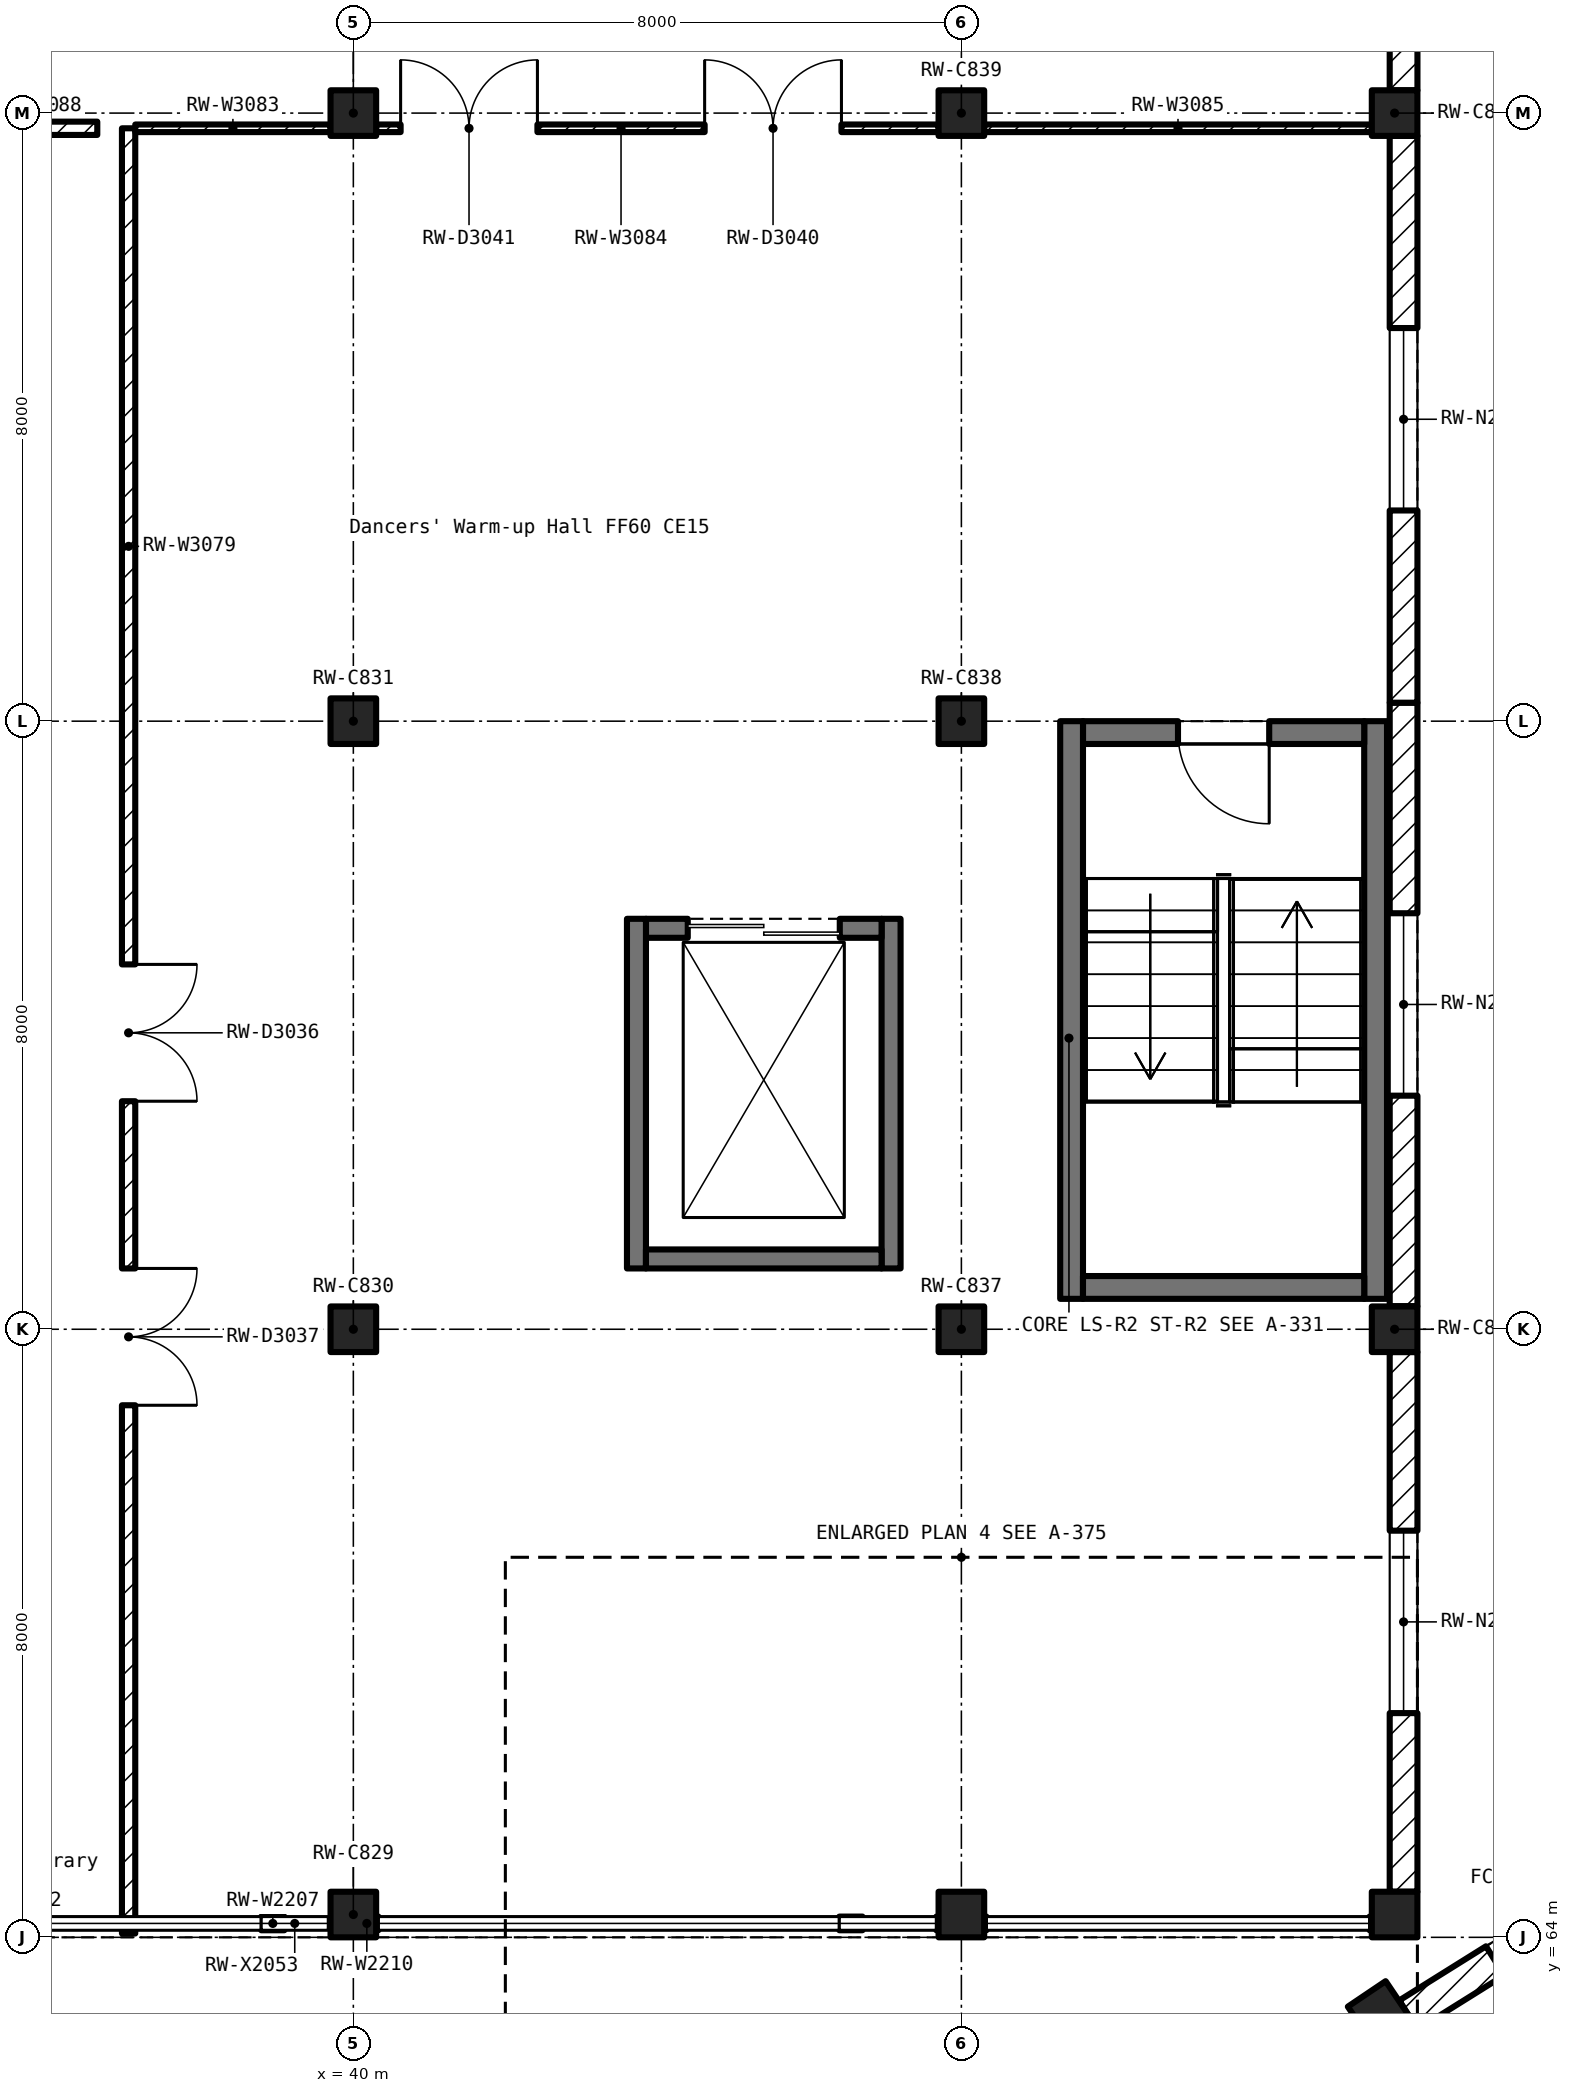
"""IFC4 building model, lengths in metres.
Left out: names, types, materials, properties, quantities, classifications, styles, units other than length and angle.
Written with IfcOpenShell. Run it as: python <this file> out.ifc"""

import sys

from ifc_helpers import new_model, si_unit, direction, frame, frame_2d, origin, origin_2d, place, context, subcontext, project, spatial, rectangle, extrude, element, fill, save


model = new_model("IFC4")
c1 = context("Model", 3, precision=1e-05, world=origin(), true_north=direction((0.0, 1.0)))
c2 = subcontext(c1, "Body", "Model", "MODEL_VIEW")
j1 = project(units=[si_unit("LENGTHUNIT", "METRE"), si_unit("PLANEANGLEUNIT", "RADIAN")], contexts=[c1])
p1 = place(None, origin())
s1 = spatial("IfcSite", under=j1, at=p1, CompositionType="ELEMENT")
p2 = place(p1, origin())
s2 = spatial("IfcBuilding", under=s1, at=p2, CompositionType="ELEMENT")
p3 = place(p2, frame((0.0, 0.0, 17.0)))
s3 = spatial("IfcBuildingStorey", under=s2, at=p3, CompositionType="ELEMENT", Elevation=17.0)
for number, where, z_axis, x_axis in (
    (1, (53.501, 63.007, 0.0), (0.0, 0.0, 1.0), (0.829, 0.559, 0.0)),
    (2, (40.0, 64.3, 0.0), (0.0, 0.0, 1.0), (1.0, 0.0, 0.0)),
    (3, (40.0, 72.0, 0.0), (0.0, 0.0, 1.0), (1.0, 0.0, 0.0)),
    (4, (40.0, 80.0, 0.0), (0.0, 0.0, 1.0), (1.0, 0.0, 0.0)),
    (5, (40.0, 88.0, 0.0), (0.0, 0.0, 1.0), (1.0, 0.0, 0.0)),
    (6, (48.0, 64.3, 0.0), (0.0, 0.0, 1.0), (1.0, 0.0, 0.0)),
    (7, (48.0, 72.0, 0.0), (0.0, 0.0, 1.0), (1.0, 0.0, 0.0)),
    (8, (48.0, 80.0, 0.0), (0.0, 0.0, 1.0), (1.0, 0.0, 0.0)),
    (9, (48.0, 88.0, 0.0), (0.0, 0.0, 1.0), (1.0, 0.0, 0.0)),
    (10, (53.7, 64.3, 0.0), (0.0, 0.0, 1.0), (1.0, 0.0, 0.0)),
    (11, (53.7, 72.0, 0.0), (0.0, 0.0, 1.0), (1.0, 0.0, 0.0)),
    (12, (53.7, 88.0, 0.0), (0.0, 0.0, 1.0), (1.0, 0.0, 0.0)),
):
    element("IfcColumn", number, at=place(p3, frame(where, z_axis=z_axis, x_axis=x_axis)), inside=s3, PredefinedType="COLUMN", context=c2, shape_type="SweptSolid", body=[
        extrude(rectangle(XDim=0.6, YDim=0.6, at=origin_2d()), origin(), (0.0, 0.0, 1.0), 5.5),
    ])
p4 = place(p3, frame((53.881, 62.979, 0.0), z_axis=(0.0, 0.0, 1.0), x_axis=(0.848094792162, 0.529844527676, 0.0)))
e13 = element("IfcWall", 13, at=p4, inside=s3, PredefinedType="SOLIDWALL", context=c2, shape_type="SweptSolid", body=[
    extrude(rectangle(XDim=4.69, YDim=0.45, at=frame_2d((2.345, 0.0))), origin(), (0.0, 0.0, 1.0), 4.48),
])
p5 = place(p4, frame((1.345, 0.0, 1.0)))
e14 = element("IfcOpeningElement", 14, at=p5, cuts=e13, PredefinedType="OPENING", context=c2, shape_type="SweptSolid", body=[
    extrude(rectangle(XDim=2.0, YDim=2.8, at=frame_2d((1.0, 1.4))), frame((0.0, 0.237, 0.0), z_axis=(0.0, -1.0, 0.0), x_axis=(1.0, 0.0, 0.0)), (0.0, 0.0, 1.0), 0.474),
])
p6 = place(p3, frame((53.818, 64.6, 0.0), z_axis=(0.0, 0.0, 1.0), x_axis=(0.0, 1.0, 0.0)))
e15 = element("IfcWall", 15, at=p6, inside=s3, PredefinedType="SOLIDWALL", context=c2, shape_type="SweptSolid", body=[
    extrude(rectangle(XDim=7.1, YDim=0.365, at=frame_2d((3.55, 0.0))), origin(), (0.0, 0.0, 1.0), 4.45),
])
p7 = place(p6, frame((2.35, 0.0, 1.0)))
e16 = element("IfcOpeningElement", 16, at=p7, cuts=e15, PredefinedType="OPENING", context=c2, shape_type="SweptSolid", body=[
    extrude(rectangle(XDim=2.4, YDim=2.0, at=frame_2d((1.2, 1.0))), frame((0.0, 0.195, 0.0), z_axis=(0.0, -1.0, 0.0), x_axis=(1.0, 0.0, 0.0)), (0.0, 0.0, 1.0), 0.389),
])
p8 = place(p3, frame((53.818, 72.304, 0.0), z_axis=(0.0, 0.0, 1.0), x_axis=(0.0, 1.0, 0.0)))
e17 = element("IfcWall", 17, at=p8, inside=s3, PredefinedType="SOLIDWALL", context=c2, shape_type="SweptSolid", body=[
    extrude(rectangle(XDim=7.939, YDim=0.365, at=frame_2d((3.969, 0.0))), origin(), (0.0, 0.0, 1.0), 4.55),
])
p9 = place(p8, frame((2.769, 0.0, 1.0)))
e18 = element("IfcOpeningElement", 18, at=p9, cuts=e17, PredefinedType="OPENING", context=c2, shape_type="SweptSolid", body=[
    extrude(rectangle(XDim=2.4, YDim=2.0, at=frame_2d((1.2, 1.0))), frame((0.0, 0.195, 0.0), z_axis=(0.0, -1.0, 0.0), x_axis=(1.0, 0.0, 0.0)), (0.0, 0.0, 1.0), 0.389),
])
p10 = place(p3, frame((53.818, 80.243, 0.0), z_axis=(0.0, 0.0, 1.0), x_axis=(0.0, 1.0, 0.0)))
e19 = element("IfcWall", 19, at=p10, inside=s3, PredefinedType="SOLIDWALL", context=c2, shape_type="SweptSolid", body=[
    extrude(rectangle(XDim=7.457, YDim=0.365, at=frame_2d((3.729, 0.0))), origin(), (0.0, 0.0, 1.0), 4.55),
])
p11 = place(p10, frame((2.529, 0.0, 1.0)))
e20 = element("IfcOpeningElement", 20, at=p11, cuts=e19, PredefinedType="OPENING", context=c2, shape_type="SweptSolid", body=[
    extrude(rectangle(XDim=2.4, YDim=2.0, at=frame_2d((1.2, 1.0))), frame((0.0, 0.195, 0.0), z_axis=(0.0, -1.0, 0.0), x_axis=(1.0, 0.0, 0.0)), (0.0, 0.0, 1.0), 0.389),
])
p12 = place(p3, frame((53.818, 88.3, 0.0), z_axis=(0.0, 0.0, 1.0), x_axis=(0.0, 1.0, 0.0)))
e21 = element("IfcWall", 21, at=p12, inside=s3, PredefinedType="SOLIDWALL", context=c2, shape_type="SweptSolid", body=[
    extrude(rectangle(XDim=7.4, YDim=0.365, at=frame_2d((3.7, 0.0))), origin(), (0.0, 0.0, 1.0), 4.55),
])
p13 = place(p12, frame((2.5, 0.0, 1.0)))
e22 = element("IfcOpeningElement", 22, at=p13, cuts=e21, PredefinedType="OPENING", context=c2, shape_type="SweptSolid", body=[
    extrude(rectangle(XDim=2.4, YDim=2.0, at=frame_2d((1.2, 1.0))), frame((0.0, 0.195, 0.0), z_axis=(0.0, -1.0, 0.0), x_axis=(1.0, 0.0, 0.0)), (0.0, 0.0, 1.0), 0.389),
])
p14 = place(p3, frame((53.45, 72.4, 0.0), z_axis=(0.0, 0.0, 1.0), x_axis=(0.0, 1.0, 0.0)))
e23 = element("IfcWall", 23, at=p14, inside=s3, PredefinedType="SOLIDWALL", context=c2, shape_type="SweptSolid", body=[
    extrude(rectangle(XDim=7.6, YDim=0.3, at=frame_2d((3.8, 0.0))), origin(), (0.0, 0.0, 1.0), 5.5),
])
p15 = place(p3, frame((53.3, 79.85, 0.0), z_axis=(0.0, 0.0, 1.0), x_axis=(-1.0, 0.0, 0.0)))
e24 = element("IfcWall", 24, at=p15, inside=s3, PredefinedType="SOLIDWALL", context=c2, shape_type="SweptSolid", body=[
    extrude(rectangle(XDim=3.7, YDim=0.3, at=frame_2d((1.85, 0.0))), origin(), (0.0, 0.0, 1.0), 5.5),
])
p16 = place(p15, frame((1.25, 0.0, 0.0)))
e25 = element("IfcOpeningElement", 25, at=p16, cuts=e24, PredefinedType="OPENING", context=c2, shape_type="SweptSolid", body=[
    extrude(rectangle(XDim=1.2, YDim=2.1, at=frame_2d((0.6, 1.05))), frame((0.0, 0.162, 0.0), z_axis=(0.0, -1.0, 0.0), x_axis=(1.0, 0.0, 0.0)), (0.0, 0.0, 1.0), 0.324),
])
p17 = place(p3, frame((49.45, 80.0, 0.0), z_axis=(0.0, 0.0, 1.0), x_axis=(0.0, -1.0, 0.0)))
e26 = element("IfcWall", 26, at=p17, inside=s3, PredefinedType="SOLIDWALL", context=c2, shape_type="SweptSolid", body=[
    extrude(rectangle(XDim=7.6, YDim=0.3, at=frame_2d((3.8, 0.0))), origin(), (0.0, 0.0, 1.0), 5.5),
])
p18 = place(p3, frame((49.6, 72.55, 0.0), z_axis=(0.0, 0.0, 1.0), x_axis=(1.0, 0.0, 0.0)))
e27 = element("IfcWall", 27, at=p18, inside=s3, PredefinedType="SOLIDWALL", context=c2, shape_type="SweptSolid", body=[
    extrude(rectangle(XDim=3.7, YDim=0.3, at=frame_2d((1.85, 0.0))), origin(), (0.0, 0.0, 1.0), 5.5),
])
p19 = place(p3, frame((59.019, 65.542, 0.0), z_axis=(0.0, 0.0, 1.0), x_axis=(-0.819160804606, -0.573563925118, 0.0)))
e28 = element("IfcWall", 28, at=p19, inside=s3, PredefinedType="SOLIDWALL", context=c2, shape_type="SweptSolid", body=[
    extrude(rectangle(XDim=5.0, YDim=0.3, at=frame_2d((2.5, 0.0))), origin(), (0.0, 0.0, 1.0), 5.5),
])
p20 = place(p3, frame((47.075, 72.8, 0.0), z_axis=(0.0, 0.0, 1.0), x_axis=(0.0, 1.0, 0.0)))
e29 = element("IfcWall", 29, at=p20, inside=s3, PredefinedType="SOLIDWALL", context=c2, shape_type="SweptSolid", body=[
    extrude(rectangle(XDim=4.6, YDim=0.25, at=frame_2d((2.3, 0.0))), origin(), (0.0, 0.0, 1.0), 5.35),
])
p21 = place(p3, frame((46.95, 77.275, 0.0), z_axis=(0.0, 0.0, 1.0), x_axis=(-1.0, 0.0, 0.0)))
e30 = element("IfcWall", 30, at=p21, inside=s3, PredefinedType="SOLIDWALL", context=c2, shape_type="SweptSolid", body=[
    extrude(rectangle(XDim=3.1, YDim=0.25, at=frame_2d((1.55, 0.0))), origin(), (0.0, 0.0, 1.0), 5.35),
])
p22 = place(p21, frame((0.55, 0.0, 0.0)))
e31 = element("IfcOpeningElement", 31, at=p22, cuts=e30, PredefinedType="OPENING", context=c2, shape_type="SweptSolid", body=[
    extrude(rectangle(XDim=2.0, YDim=2.2, at=frame_2d((1.0, 1.1))), frame((0.0, 0.137, 0.0), z_axis=(0.0, -1.0, 0.0), x_axis=(1.0, 0.0, 0.0)), (0.0, 0.0, 1.0), 0.274),
])
p23 = place(p3, frame((43.725, 77.4, 0.0), z_axis=(0.0, 0.0, 1.0), x_axis=(0.0, -1.0, 0.0)))
e32 = element("IfcWall", 32, at=p23, inside=s3, PredefinedType="SOLIDWALL", context=c2, shape_type="SweptSolid", body=[
    extrude(rectangle(XDim=4.6, YDim=0.25, at=frame_2d((2.3, 0.0))), origin(), (0.0, 0.0, 1.0), 5.35),
])
p24 = place(p3, frame((43.85, 72.925, 0.0), z_axis=(0.0, 0.0, 1.0), x_axis=(1.0, 0.0, 0.0)))
e33 = element("IfcWall", 33, at=p24, inside=s3, PredefinedType="SOLIDWALL", context=c2, shape_type="SweptSolid", body=[
    extrude(rectangle(XDim=3.1, YDim=0.25, at=frame_2d((1.55, 0.0))), origin(), (0.0, 0.0, 1.0), 5.35),
])
p25 = place(p3, frame((37.043, 87.8, 0.0), z_axis=(0.0, 0.0, 1.0), x_axis=(0.0, -1.0, 0.0)))
e34 = element("IfcWall", 34, at=p25, inside=s3, PredefinedType="PARTITIONING", context=c2, shape_type="SweptSolid", body=[
    extrude(rectangle(XDim=23.75, YDim=0.175, at=frame_2d((11.875, 0.0))), origin(), (0.0, 0.0, 1.0), 4.35),
])
p26 = place(p25, frame((11.0, 0.0, 0.0)))
e35 = element("IfcOpeningElement", 35, at=p26, cuts=e34, PredefinedType="OPENING", context=c2, shape_type="SweptSolid", body=[
    extrude(rectangle(XDim=1.8, YDim=2.1, at=frame_2d((0.9, 1.05))), frame((0.0, 0.1, 0.0), z_axis=(0.0, -1.0, 0.0), x_axis=(1.0, 0.0, 0.0)), (0.0, 0.0, 1.0), 0.199),
])
p27 = place(p25, frame((15.0, 0.0, 0.0)))
e36 = element("IfcOpeningElement", 36, at=p27, cuts=e34, PredefinedType="OPENING", context=c2, shape_type="SweptSolid", body=[
    extrude(rectangle(XDim=1.8, YDim=2.1, at=frame_2d((0.9, 1.05))), frame((0.0, 0.1, 0.0), z_axis=(0.0, -1.0, 0.0), x_axis=(1.0, 0.0, 0.0)), (0.0, 0.0, 1.0), 0.199),
])
p28 = place(p3, frame((37.131, 87.8, 0.0), z_axis=(0.0, 0.0, 1.0), x_axis=(1.0, 0.0, 0.0)))
e37 = element("IfcWall", 37, at=p28, inside=s3, PredefinedType="PARTITIONING", context=c2, shape_type="SweptSolid", body=[
    extrude(rectangle(XDim=2.569, YDim=0.1, at=frame_2d((1.284, 0.0))), origin(), (0.0, 0.0, 1.0), 4.35),
])
p29 = place(p3, frame((40.3, 87.8, 0.0), z_axis=(0.0, 0.0, 1.0), x_axis=(1.0, 0.0, 0.0)))
e38 = element("IfcWall", 38, at=p29, inside=s3, PredefinedType="PARTITIONING", context=c2, shape_type="SweptSolid", body=[
    extrude(rectangle(XDim=7.4, YDim=0.1, at=frame_2d((3.7, 0.0))), origin(), (0.0, 0.0, 1.0), 4.35),
])
p30 = place(p29, frame((4.322, 0.0, 0.0)))
e39 = element("IfcOpeningElement", 39, at=p30, cuts=e38, PredefinedType="OPENING", context=c2, shape_type="SweptSolid", body=[
    extrude(rectangle(XDim=1.8, YDim=2.1, at=frame_2d((0.9, 1.05))), frame((0.0, 0.062, 0.0), z_axis=(0.0, -1.0, 0.0), x_axis=(1.0, 0.0, 0.0)), (0.0, 0.0, 1.0), 0.124),
])
p31 = place(p29, frame((0.322, 0.0, 0.0)))
e40 = element("IfcOpeningElement", 40, at=p31, cuts=e38, PredefinedType="OPENING", context=c2, shape_type="SweptSolid", body=[
    extrude(rectangle(XDim=1.8, YDim=2.1, at=frame_2d((0.9, 1.05))), frame((0.0, 0.062, 0.0), z_axis=(0.0, -1.0, 0.0), x_axis=(1.0, 0.0, 0.0)), (0.0, 0.0, 1.0), 0.124),
])
p32 = place(p3, frame((48.3, 87.8, 0.0), z_axis=(0.0, 0.0, 1.0), x_axis=(1.0, 0.0, 0.0)))
e41 = element("IfcWall", 41, at=p32, inside=s3, PredefinedType="PARTITIONING", context=c2, shape_type="SweptSolid", body=[
    extrude(rectangle(XDim=5.1, YDim=0.1, at=frame_2d((2.55, 0.0))), origin(), (0.0, 0.0, 1.0), 4.35),
])
p33 = place(p3, frame((35.0, 87.8, 0.0), z_axis=(0.0, 0.0, 1.0), x_axis=(1.0, 0.0, 0.0)))
e42 = element("IfcWall", 42, at=p33, inside=s3, PredefinedType="PARTITIONING", context=c2, shape_type="SweptSolid", body=[
    extrude(rectangle(XDim=1.631, YDim=0.175, at=frame_2d((0.815, 0.0))), origin(), (0.0, 0.0, 1.0), 4.35),
])
for number, where, z_axis, x_axis in (
    (43, (38.788, 64.183, 0.0), (0.0, 0.0, 1.0), (1.0, 0.0, 0.0)),
    (44, (46.394, 64.183, 0.0), (0.0, 0.0, 1.0), (1.0, 0.0, 0.0)),
):
    element("IfcWall", number, at=place(p3, frame(where, z_axis=z_axis, x_axis=x_axis)), inside=s3, PredefinedType="SOLIDWALL", context=c2, shape_type="SweptSolid", body=[
        extrude(rectangle(XDim=0.305, YDim=0.18, at=frame_2d((0.152, 0.0))), origin(), (0.0, 0.0, 1.0), 3.6),
    ])
for number, where, z_axis, x_axis in (
    (45, (40.33, 64.183, 0.0), (0.0, 0.0, 1.0), (-1.0, 0.0, 0.0)),
    (46, (47.67, 64.183, 0.0), (0.0, 0.0, 1.0), (1.0, 0.0, 0.0)),
):
    element("IfcWall", number, at=place(p3, frame(where, z_axis=z_axis, x_axis=x_axis)), inside=s3, PredefinedType="SOLIDWALL", context=c2, shape_type="SweptSolid", body=[
        extrude(rectangle(XDim=0.305, YDim=0.18, at=frame_2d((0.153, 0.0))), origin(), (0.0, 0.0, 1.0), 3.6),
    ])
p34 = place(p3, frame((53.37, 64.183, 0.0), z_axis=(0.0, 0.0, 1.0), x_axis=(1.0, 0.0, 0.0)))
e47 = element("IfcWall", 47, at=p34, inside=s3, PredefinedType="SOLIDWALL", context=c2, shape_type="SweptSolid", body=[
    extrude(rectangle(XDim=0.305, YDim=0.18, at=frame_2d((0.152, 0.0))), origin(), (0.0, 0.0, 1.0), 3.6),
])
p35 = place(p3, frame((48.33, 64.183, 0.0), z_axis=(0.0, 0.0, 1.0), x_axis=(-1.0, 0.0, 0.0)))
e48 = element("IfcWall", 48, at=p35, inside=s3, PredefinedType="SOLIDWALL", context=c2, shape_type="SweptSolid", body=[
    extrude(rectangle(XDim=0.305, YDim=0.18, at=frame_2d((0.153, 0.0))), origin(), (0.0, 0.0, 1.0), 3.6),
])
p36 = place(p7, origin())
e49 = element("IfcWindow", 49, at=p36, inside=s3, PartitioningType="DOUBLE_PANEL_VERTICAL", PredefinedType="WINDOW", context=c2, shape_type="SweptSolid", body=[
    extrude(rectangle(XDim=2.4, YDim=2.0, at=frame_2d((1.2, 1.0))), frame((0.0, 0.03, 0.0), z_axis=(0.0, -1.0, 0.0), x_axis=(1.0, 0.0, 0.0)), (0.0, 0.0, 1.0), 0.06),
])
fill(e16, e49)
p37 = place(p9, origin())
e50 = element("IfcWindow", 50, at=p37, inside=s3, PartitioningType="DOUBLE_PANEL_VERTICAL", PredefinedType="WINDOW", context=c2, shape_type="SweptSolid", body=[
    extrude(rectangle(XDim=2.4, YDim=2.0, at=frame_2d((1.2, 1.0))), frame((0.0, 0.03, 0.0), z_axis=(0.0, -1.0, 0.0), x_axis=(1.0, 0.0, 0.0)), (0.0, 0.0, 1.0), 0.06),
])
fill(e18, e50)
p38 = place(p11, origin())
e51 = element("IfcWindow", 51, at=p38, inside=s3, PartitioningType="DOUBLE_PANEL_VERTICAL", PredefinedType="WINDOW", context=c2, shape_type="SweptSolid", body=[
    extrude(rectangle(XDim=2.4, YDim=2.0, at=frame_2d((1.2, 1.0))), frame((0.0, 0.03, 0.0), z_axis=(0.0, -1.0, 0.0), x_axis=(1.0, 0.0, 0.0)), (0.0, 0.0, 1.0), 0.06),
])
fill(e20, e51)
p39 = place(p16, origin())
e52 = element("IfcDoor", 52, at=p39, inside=s3, OperationType="SINGLE_SWING_LEFT", PredefinedType="DOOR", context=c2, shape_type="SweptSolid", body=[
    extrude(rectangle(XDim=1.2, YDim=2.1, at=frame_2d((0.6, 1.05))), frame((0.0, 0.025, 0.0), z_axis=(0.0, -1.0, 0.0), x_axis=(1.0, 0.0, 0.0)), (0.0, 0.0, 1.0), 0.05),
])
fill(e25, e52)
p40 = place(p22, origin())
e53 = element("IfcDoor", 53, at=p40, inside=s3, OperationType="DOUBLE_DOOR_SLIDING", PredefinedType="DOOR", context=c2, shape_type="SweptSolid", body=[
    extrude(rectangle(XDim=2.0, YDim=2.2, at=frame_2d((1.0, 1.1))), frame((0.0, 0.025, 0.0), z_axis=(0.0, -1.0, 0.0), x_axis=(1.0, 0.0, 0.0)), (0.0, 0.0, 1.0), 0.05),
])
fill(e31, e53)
p41 = place(p26, origin())
e54 = element("IfcDoor", 54, at=p41, inside=s3, OperationType="DOUBLE_DOOR_SINGLE_SWING", PredefinedType="DOOR", context=c2, shape_type="SweptSolid", body=[
    extrude(rectangle(XDim=1.8, YDim=2.1, at=frame_2d((0.9, 1.05))), frame((0.0, 0.025, 0.0), z_axis=(0.0, -1.0, 0.0), x_axis=(1.0, 0.0, 0.0)), (0.0, 0.0, 1.0), 0.05),
])
fill(e35, e54)
p42 = place(p27, origin())
e55 = element("IfcDoor", 55, at=p42, inside=s3, OperationType="DOUBLE_DOOR_SINGLE_SWING", PredefinedType="DOOR", context=c2, shape_type="SweptSolid", body=[
    extrude(rectangle(XDim=1.8, YDim=2.1, at=frame_2d((0.9, 1.05))), frame((0.0, 0.025, 0.0), z_axis=(0.0, -1.0, 0.0), x_axis=(1.0, 0.0, 0.0)), (0.0, 0.0, 1.0), 0.05),
])
fill(e36, e55)
p43 = place(p30, origin())
e56 = element("IfcDoor", 56, at=p43, inside=s3, OperationType="DOUBLE_DOOR_SINGLE_SWING", PredefinedType="DOOR", context=c2, shape_type="SweptSolid", body=[
    extrude(rectangle(XDim=1.8, YDim=2.1, at=frame_2d((0.9, 1.05))), frame((0.0, 0.025, 0.0), z_axis=(0.0, -1.0, 0.0), x_axis=(1.0, 0.0, 0.0)), (0.0, 0.0, 1.0), 0.05),
])
fill(e39, e56)
p44 = place(p31, origin())
e57 = element("IfcDoor", 57, at=p44, inside=s3, OperationType="DOUBLE_DOOR_SINGLE_SWING", PredefinedType="DOOR", context=c2, shape_type="SweptSolid", body=[
    extrude(rectangle(XDim=1.8, YDim=2.1, at=frame_2d((0.9, 1.05))), frame((0.0, 0.025, 0.0), z_axis=(0.0, -1.0, 0.0), x_axis=(1.0, 0.0, 0.0)), (0.0, 0.0, 1.0), 0.05),
])
fill(e40, e57)
save(model, sys.argv[1])
